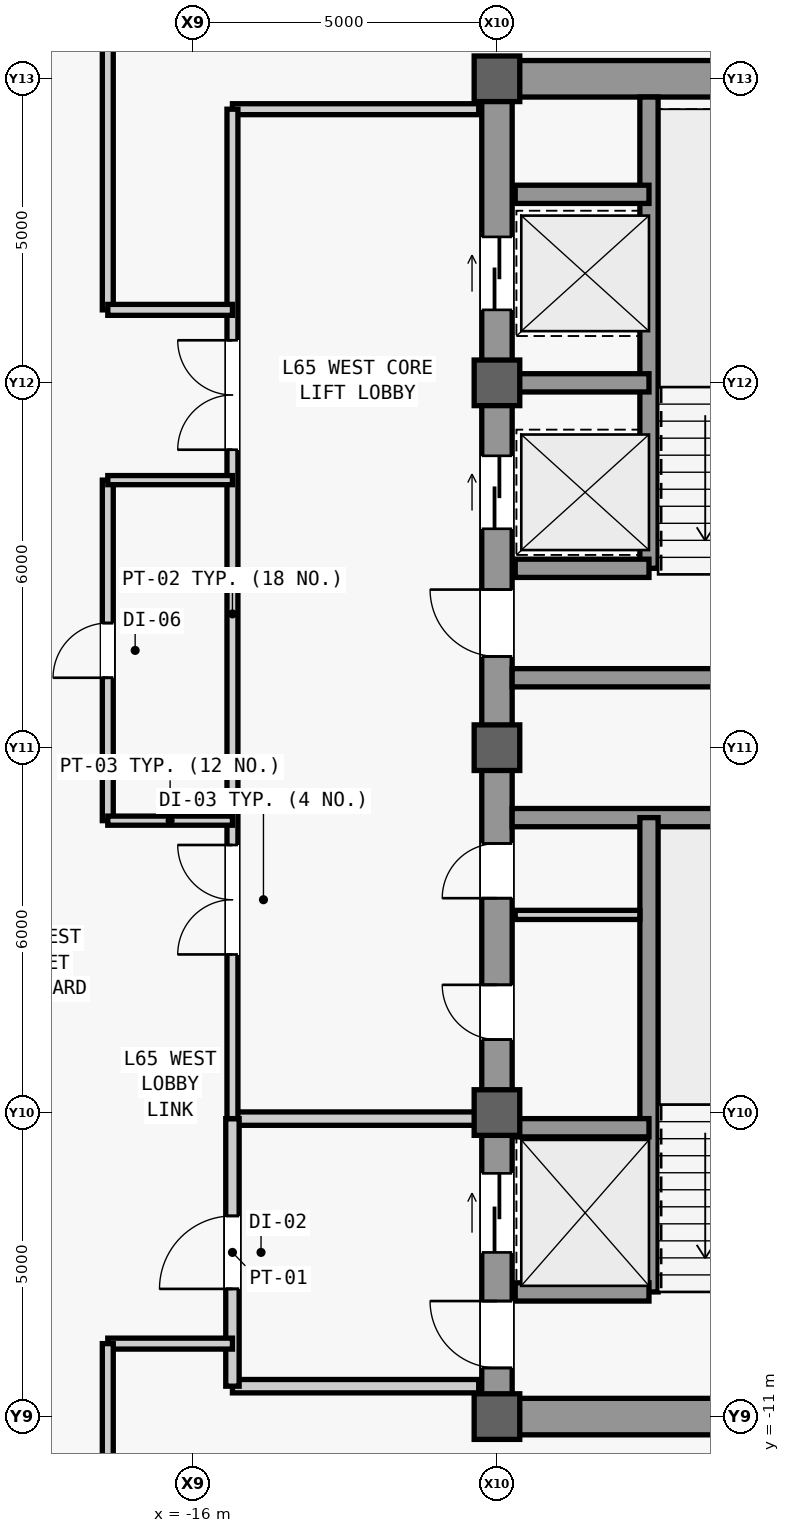
"""IFC4 building model, lengths in metres.
Left out: names, types, materials, properties, quantities, classifications, styles, units other than length and angle.
Written with IfcOpenShell. Run it as: python <this file> out.ifc"""

import sys

from ifc_helpers import new_model, si_unit, direction, frame, frame_2d, origin, origin_2d, place, context, subcontext, project, spatial, rectangle, extrude, source, transform, mapped, element, fill, save


model = new_model("IFC4")
c1 = context("Model", 3, precision=1e-05, world=origin(), true_north=direction((0.0, 1.0)))
c2 = subcontext(c1, "Body", "Model", "MODEL_VIEW")
j1 = project(units=[si_unit("LENGTHUNIT", "METRE"), si_unit("PLANEANGLEUNIT", "RADIAN")], contexts=[c1])
p1 = place(None, origin())
s1 = spatial("IfcSite", under=j1, at=p1, CompositionType="ELEMENT")
p2 = place(p1, origin())
s2 = spatial("IfcBuilding", under=s1, at=p2, CompositionType="ELEMENT")
p3 = place(p2, frame((0.0, 0.0, 277.5)))
s3 = spatial("IfcBuildingStorey", under=s2, at=p3, CompositionType="ELEMENT", Elevation=277.5)
m1 = source(origin(), c2, "Body", "SweptSolid", [
    extrude(rectangle(XDim=22.0, YDim=0.5, at=frame_2d((11.0, 0.0))), origin(), (0.0, 0.0, 1.0), 3.78),
])
p4 = place(p3, frame((-11.0, -11.0, 0.0), z_axis=(0.0, 0.0, 1.0), x_axis=(0.0, 1.0, 0.0)))
e1 = element("IfcWall", 1, at=p4, inside=s3, PredefinedType="SHEAR", context=c2, shape_type="MappedRepresentation", body=[
    mapped(m1, transform((0.0, 0.0, 0.0), scale=1.0)),
])
m2 = source(origin(), c2, "Body", "SweptSolid", [
    extrude(rectangle(XDim=1.1, YDim=2.2, at=frame_2d((0.55, 1.1))), frame((0.0, 0.26, 0.0), z_axis=(0.0, -1.0, 0.0), x_axis=(1.0, 0.0, 0.0)), (0.0, 0.0, 1.0), 0.52),
])
p5 = place(p4, frame((0.8, 0.0, 0.0)))
e2 = element("IfcOpeningElement", 2, at=p5, cuts=e1, PredefinedType="OPENING", context=c2, shape_type="MappedRepresentation", body=[
    mapped(m2, transform((0.0, 0.0, 0.0), scale=1.0)),
])
p6 = place(p4, frame((12.5, 0.0, 0.0)))
e3 = element("IfcOpeningElement", 3, at=p6, cuts=e1, PredefinedType="OPENING", context=c2, shape_type="MappedRepresentation", body=[
    mapped(m2, transform((0.0, 0.0, 0.0), scale=1.0)),
])
m3 = source(origin(), c2, "Body", "SweptSolid", [
    extrude(rectangle(XDim=0.9, YDim=2.15, at=frame_2d((0.45, 1.075))), frame((0.0, 0.26, 0.0), z_axis=(0.0, -1.0, 0.0), x_axis=(1.0, 0.0, 0.0)), (0.0, 0.0, 1.0), 0.52),
])
p7 = place(p4, frame((6.2, 0.0, 0.0)))
e4 = element("IfcOpeningElement", 4, at=p7, cuts=e1, PredefinedType="OPENING", context=c2, shape_type="MappedRepresentation", body=[
    mapped(m3, transform((0.0, 0.0, 0.0), scale=1.0)),
])
p8 = place(p4, frame((8.525, 0.0, 0.0)))
e5 = element("IfcOpeningElement", 5, at=p8, cuts=e1, PredefinedType="OPENING", context=c2, shape_type="MappedRepresentation", body=[
    mapped(m3, transform((0.0, 0.0, 0.0), scale=1.0)),
])
m4 = source(origin(), c2, "Body", "SweptSolid", [
    extrude(rectangle(XDim=1.2, YDim=2.3, at=frame_2d((0.6, 1.15))), frame((0.0, 0.26, 0.0), z_axis=(0.0, -1.0, 0.0), x_axis=(1.0, 0.0, 0.0)), (0.0, 0.0, 1.0), 0.52),
])
p9 = place(p4, frame((14.6, 0.0, 0.0)))
e6 = element("IfcOpeningElement", 6, at=p9, cuts=e1, PredefinedType="OPENING", context=c2, shape_type="MappedRepresentation", body=[
    mapped(m4, transform((0.0, 0.0, 0.0), scale=1.0)),
])
p10 = place(p4, frame((18.2, 0.0, 0.0)))
e7 = element("IfcOpeningElement", 7, at=p10, cuts=e1, PredefinedType="OPENING", context=c2, shape_type="MappedRepresentation", body=[
    mapped(m4, transform((0.0, 0.0, 0.0), scale=1.0)),
])
m5 = source(origin(), c2, "Body", "SweptSolid", [
    extrude(rectangle(XDim=1.3, YDim=2.3, at=frame_2d((0.65, 1.15))), frame((0.0, 0.26, 0.0), z_axis=(0.0, -1.0, 0.0), x_axis=(1.0, 0.0, 0.0)), (0.0, 0.0, 1.0), 0.52),
])
p11 = place(p4, frame((2.7, 0.0, 0.0)))
e8 = element("IfcOpeningElement", 8, at=p11, cuts=e1, PredefinedType="OPENING", context=c2, shape_type="MappedRepresentation", body=[
    mapped(m5, transform((0.0, 0.0, 0.0), scale=1.0)),
])
m6 = source(origin(), c2, "Body", "SweptSolid", [
    extrude(rectangle(XDim=5.9, YDim=0.6, at=frame_2d((2.95, 0.0))), origin(), (0.0, 0.0, 1.0), 3.78),
])
for number, where, z_axis, x_axis in (
    (9, (-10.75, -11.0, 0.0), (0.0, 0.0, 1.0), (1.0, 0.0, 0.0)),
    (10, (-10.75, 11.0, 0.0), (0.0, 0.0, 1.0), (1.0, 0.0, 0.0)),
):
    element("IfcWall", number, at=place(p3, frame(where, z_axis=z_axis, x_axis=x_axis)), inside=s3, PredefinedType="SHEAR", context=c2, shape_type="MappedRepresentation", body=[
        mapped(m6, transform((0.0, 0.0, 0.0), scale=1.0)),
    ])
m7 = source(origin(), c2, "Body", "SweptSolid", [
    extrude(rectangle(XDim=5.65, YDim=0.3, at=frame_2d((2.825, 0.0))), origin(), (0.0, 0.0, 1.0), 3.78),
])
for number, where, z_axis, x_axis in (
    (11, (-10.75, -1.15, 0.0), (0.0, 0.0, 1.0), (1.0, 0.0, 0.0)),
    (12, (-10.75, 1.15, 0.0), (0.0, 0.0, 1.0), (1.0, 0.0, 0.0)),
):
    element("IfcWall", number, at=place(p3, frame(where, z_axis=z_axis, x_axis=x_axis)), inside=s3, PredefinedType="SHEAR", context=c2, shape_type="MappedRepresentation", body=[
        mapped(m7, transform((0.0, 0.0, 0.0), scale=1.0)),
    ])
m8 = source(origin(), c2, "Body", "SweptSolid", [
    extrude(rectangle(XDim=0.75, YDim=0.75, at=origin_2d()), origin(), (0.0, 0.0, 1.0), 4.0),
])
for number, where, z_axis, x_axis in (
    (13, (-11.0, -11.0, 0.0), (0.0, 0.0, 1.0), (1.0, 0.0, 0.0)),
    (14, (-11.0, -6.0, 0.0), (0.0, 0.0, 1.0), (1.0, 0.0, 0.0)),
    (15, (-11.0, 0.0, 0.0), (0.0, 0.0, 1.0), (1.0, 0.0, 0.0)),
    (16, (-11.0, 6.0, 0.0), (0.0, 0.0, 1.0), (1.0, 0.0, 0.0)),
    (17, (-11.0, 11.0, 0.0), (0.0, 0.0, 1.0), (1.0, 0.0, 0.0)),
):
    element("IfcColumn", number, at=place(p3, frame(where, z_axis=z_axis, x_axis=x_axis)), inside=s3, PredefinedType="COLUMN", context=c2, shape_type="MappedRepresentation", body=[
        mapped(m8, transform((0.0, 0.0, 0.0), scale=1.0)),
    ])
m9 = source(origin(), c2, "Body", "SweptSolid", [
    extrude(rectangle(XDim=7.8, YDim=0.3, at=frame_2d((3.9, 0.0))), origin(), (0.0, 0.0, 1.0), 3.78),
])
p12 = place(p3, frame((-8.5, -8.95, 0.0), z_axis=(0.0, 0.0, 1.0), x_axis=(0.0, 1.0, 0.0)))
e18 = element("IfcWall", 18, at=p12, inside=s3, PredefinedType="SHEAR", context=c2, shape_type="MappedRepresentation", body=[
    mapped(m9, transform((0.0, 0.0, 0.0), scale=1.0)),
])
m10 = source(origin(), c2, "Body", "SweptSolid", [
    extrude(rectangle(XDim=2.2, YDim=0.3, at=frame_2d((1.1, 0.0))), origin(), (0.0, 0.0, 1.0), 3.78),
])
for number, where, z_axis, x_axis in (
    (19, (-10.7, -8.95, 0.0), (0.0, 0.0, 1.0), (1.0, 0.0, 0.0)),
    (20, (-10.7, -6.25, 0.0), (0.0, 0.0, 1.0), (1.0, 0.0, 0.0)),
):
    element("IfcWall", number, at=place(p3, frame(where, z_axis=z_axis, x_axis=x_axis)), inside=s3, PredefinedType="SHEAR", context=c2, shape_type="MappedRepresentation", body=[
        mapped(m10, transform((0.0, 0.0, 0.0), scale=1.0)),
    ])
m11 = source(origin(), c2, "Body", "SweptSolid", [
    extrude(rectangle(XDim=7.75, YDim=0.3, at=frame_2d((3.875, 0.0))), origin(), (0.0, 0.0, 1.0), 3.78),
])
p13 = place(p3, frame((-8.5, 2.95, 0.0), z_axis=(0.0, 0.0, 1.0), x_axis=(0.0, 1.0, 0.0)))
e21 = element("IfcWall", 21, at=p13, inside=s3, PredefinedType="SHEAR", context=c2, shape_type="MappedRepresentation", body=[
    mapped(m11, transform((0.0, 0.0, 0.0), scale=1.0)),
])
for number, where, z_axis, x_axis in (
    (22, (-10.7, 2.95, 0.0), (0.0, 0.0, 1.0), (1.0, 0.0, 0.0)),
    (23, (-10.7, 6.0, 0.0), (0.0, 0.0, 1.0), (1.0, 0.0, 0.0)),
    (24, (-10.7, 9.1, 0.0), (0.0, 0.0, 1.0), (1.0, 0.0, 0.0)),
):
    element("IfcWall", number, at=place(p3, frame(where, z_axis=z_axis, x_axis=x_axis)), inside=s3, PredefinedType="SHEAR", context=c2, shape_type="MappedRepresentation", body=[
        mapped(m10, transform((0.0, 0.0, 0.0), scale=1.0)),
    ])
m12 = source(origin(), c2, "Body", "SweptSolid", [
    extrude(rectangle(XDim=2.05, YDim=0.15, at=frame_2d((1.025, 0.0))), origin(), (0.0, 0.0, 1.0), 3.78),
])
p14 = place(p3, frame((-10.7, -2.75, 0.0), z_axis=(0.0, 0.0, 1.0), x_axis=(1.0, 0.0, 0.0)))
e25 = element("IfcWall", 25, at=p14, inside=s3, PredefinedType="PARTITIONING", context=c2, shape_type="MappedRepresentation", body=[
    mapped(m12, transform((0.0, 0.0, 0.0), scale=1.0)),
])
m13 = source(origin(), c2, "Body", "SweptSolid", [
    extrude(rectangle(XDim=4.05, YDim=0.22, at=frame_2d((2.025, 0.0))), origin(), (0.0, 0.0, 1.0), 3.78),
])
p15 = place(p3, frame((-15.35, -10.5, 0.0), z_axis=(0.0, 0.0, 1.0), x_axis=(1.0, 0.0, 0.0)))
e26 = element("IfcWall", 26, at=p15, inside=s3, PredefinedType="PARTITIONING", context=c2, shape_type="MappedRepresentation", body=[
    mapped(m13, transform((0.0, 0.0, 0.0), scale=1.0)),
])
m14 = source(origin(), c2, "Body", "SweptSolid", [
    extrude(rectangle(XDim=4.05, YDim=0.22, at=frame_2d((2.025, 0.0))), origin(), (0.0, 0.0, 1.0), 3.085),
])
p16 = place(p3, frame((-15.35, -6.1, 0.0), z_axis=(0.0, 0.0, 1.0), x_axis=(1.0, 0.0, 0.0)))
e27 = element("IfcWall", 27, at=p16, inside=s3, PredefinedType="PARTITIONING", context=c2, shape_type="MappedRepresentation", body=[
    mapped(m14, transform((0.0, 0.0, 0.0), scale=1.0)),
])
m15 = source(origin(), c2, "Body", "SweptSolid", [
    extrude(rectangle(XDim=4.4, YDim=0.22, at=frame_2d((2.2, 0.0))), origin(), (0.0, 0.0, 1.0), 3.78),
])
p17 = place(p3, frame((-15.35, -10.5, 0.0), z_axis=(0.0, 0.0, 1.0), x_axis=(0.0, 1.0, 0.0)))
e28 = element("IfcWall", 28, at=p17, inside=s3, PredefinedType="PARTITIONING", context=c2, shape_type="MappedRepresentation", body=[
    mapped(m15, transform((0.0, 0.0, 0.0), scale=1.0)),
])
m16 = source(origin(), c2, "Body", "SweptSolid", [
    extrude(rectangle(XDim=1.2, YDim=2.2, at=frame_2d((0.6, 1.1))), frame((0.0, 0.12, 0.0), z_axis=(0.0, -1.0, 0.0), x_axis=(1.0, 0.0, 0.0)), (0.0, 0.0, 1.0), 0.24),
])
p18 = place(p17, frame((1.6, 0.0, 0.0)))
e29 = element("IfcOpeningElement", 29, at=p18, cuts=e28, PredefinedType="OPENING", context=c2, shape_type="MappedRepresentation", body=[
    mapped(m16, transform((0.0, 0.0, 0.0), scale=1.0)),
])
m17 = source(origin(), c2, "Body", "SweptSolid", [
    extrude(rectangle(XDim=4.05, YDim=0.18, at=frame_2d((2.025, 0.0))), origin(), (0.0, 0.0, 1.0), 3.78),
])
p19 = place(p3, frame((-15.35, 10.5, 0.0), z_axis=(0.0, 0.0, 1.0), x_axis=(1.0, 0.0, 0.0)))
e30 = element("IfcWall", 30, at=p19, inside=s3, PredefinedType="PARTITIONING", context=c2, shape_type="MappedRepresentation", body=[
    mapped(m17, transform((0.0, 0.0, 0.0), scale=1.0)),
])
m18 = source(origin(), c2, "Body", "SweptSolid", [
    extrude(rectangle(XDim=16.6, YDim=0.18, at=frame_2d((8.3, 0.0))), origin(), (0.0, 0.0, 1.0), 3.78),
])
p20 = place(p3, frame((-15.35, -6.1, 0.0), z_axis=(0.0, 0.0, 1.0), x_axis=(0.0, 1.0, 0.0)))
e31 = element("IfcWall", 31, at=p20, inside=s3, PredefinedType="PARTITIONING", context=c2, shape_type="MappedRepresentation", body=[
    mapped(m18, transform((0.0, 0.0, 0.0), scale=1.0)),
])
m19 = source(origin(), c2, "Body", "SweptSolid", [
    extrude(rectangle(XDim=1.8, YDim=2.25, at=frame_2d((0.9, 1.125))), frame((0.0, 0.1, 0.0), z_axis=(0.0, -1.0, 0.0), x_axis=(1.0, 0.0, 0.0)), (0.0, 0.0, 1.0), 0.2),
])
p21 = place(p20, frame((2.7, 0.0, 0.0)))
e32 = element("IfcOpeningElement", 32, at=p21, cuts=e31, PredefinedType="OPENING", context=c2, shape_type="MappedRepresentation", body=[
    mapped(m19, transform((0.0, 0.0, 0.0), scale=1.0)),
])
p22 = place(p20, frame((11.0, 0.0, 0.0)))
e33 = element("IfcOpeningElement", 33, at=p22, cuts=e31, PredefinedType="OPENING", context=c2, shape_type="MappedRepresentation", body=[
    mapped(m19, transform((0.0, 0.0, 0.0), scale=1.0)),
])
m20 = source(origin(), c2, "Body", "SweptSolid", [
    extrude(rectangle(XDim=5.6, YDim=0.18, at=frame_2d((2.8, 0.0))), origin(), (0.0, 0.0, 1.0), 3.78),
])
p23 = place(p3, frame((-17.4, -1.2, 0.0), z_axis=(0.0, 0.0, 1.0), x_axis=(0.0, 1.0, 0.0)))
e34 = element("IfcWall", 34, at=p23, inside=s3, PredefinedType="PARTITIONING", context=c2, shape_type="MappedRepresentation", body=[
    mapped(m20, transform((0.0, 0.0, 0.0), scale=1.0)),
])
m21 = source(origin(), c2, "Body", "SweptSolid", [
    extrude(rectangle(XDim=0.9, YDim=2.15, at=frame_2d((0.45, 1.075))), frame((0.0, 0.1, 0.0), z_axis=(0.0, -1.0, 0.0), x_axis=(1.0, 0.0, 0.0)), (0.0, 0.0, 1.0), 0.2),
])
p24 = place(p23, frame((2.35, 0.0, 0.0)))
e35 = element("IfcOpeningElement", 35, at=p24, cuts=e34, PredefinedType="OPENING", context=c2, shape_type="MappedRepresentation", body=[
    mapped(m21, transform((0.0, 0.0, 0.0), scale=1.0)),
])
m22 = source(origin(), c2, "Body", "SweptSolid", [
    extrude(rectangle(XDim=2.05, YDim=0.15, at=frame_2d((1.025, 0.0))), origin(), (0.0, 0.0, 1.0), 3.78),
])
for number, where, z_axis, x_axis in (
    (36, (-17.4, -1.2, 0.0), (0.0, 0.0, 1.0), (1.0, 0.0, 0.0)),
    (37, (-17.4, 4.4, 0.0), (0.0, 0.0, 1.0), (1.0, 0.0, 0.0)),
):
    element("IfcWall", number, at=place(p3, frame(where, z_axis=z_axis, x_axis=x_axis)), inside=s3, PredefinedType="PARTITIONING", context=c2, shape_type="MappedRepresentation", body=[
        mapped(m22, transform((0.0, 0.0, 0.0), scale=1.0)),
    ])
m23 = source(origin(), c2, "Body", "SweptSolid", [
    extrude(rectangle(XDim=2.05, YDim=0.18, at=frame_2d((1.025, 0.0))), origin(), (0.0, 0.0, 1.0), 3.78),
])
p25 = place(p3, frame((-17.4, -9.8, 0.0), z_axis=(0.0, 0.0, 1.0), x_axis=(1.0, 0.0, 0.0)))
e38 = element("IfcWall", 38, at=p25, inside=s3, PredefinedType="PARTITIONING", context=c2, shape_type="MappedRepresentation", body=[
    mapped(m23, transform((0.0, 0.0, 0.0), scale=1.0)),
])
m24 = source(origin(), c2, "Body", "SweptSolid", [
    extrude(rectangle(XDim=8.4, YDim=0.18, at=frame_2d((4.2, 0.0))), origin(), (0.0, 0.0, 1.0), 3.78),
])
p26 = place(p3, frame((-17.4, 7.2, 0.0), z_axis=(0.0, 0.0, 1.0), x_axis=(0.0, 1.0, 0.0)))
e39 = element("IfcWall", 39, at=p26, inside=s3, PredefinedType="PARTITIONING", context=c2, shape_type="MappedRepresentation", body=[
    mapped(m24, transform((0.0, 0.0, 0.0), scale=1.0)),
])
p27 = place(p3, frame((-17.4, 7.2, 0.0), z_axis=(0.0, 0.0, 1.0), x_axis=(1.0, 0.0, 0.0)))
e40 = element("IfcWall", 40, at=p27, inside=s3, PredefinedType="PARTITIONING", context=c2, shape_type="MappedRepresentation", body=[
    mapped(m23, transform((0.0, 0.0, 0.0), scale=1.0)),
])
m25 = source(origin(), c2, "Body", "SweptSolid", [
    extrude(rectangle(XDim=7.2, YDim=0.18, at=frame_2d((3.6, 0.0))), origin(), (0.0, 0.0, 1.0), 3.78),
])
p28 = place(p3, frame((-17.4, -17.0, 0.0), z_axis=(0.0, 0.0, 1.0), x_axis=(0.0, 1.0, 0.0)))
e41 = element("IfcWall", 41, at=p28, inside=s3, PredefinedType="PARTITIONING", context=c2, shape_type="MappedRepresentation", body=[
    mapped(m25, transform((0.0, 0.0, 0.0), scale=1.0)),
])
m26 = source(origin(), c2, "Body", "SweptSolid", [
    extrude(rectangle(XDim=1.1, YDim=2.2, at=frame_2d((0.55, 1.1))), frame((0.0, 0.025, 0.0), z_axis=(0.0, -1.0, 0.0), x_axis=(1.0, 0.0, 0.0)), (0.0, 0.0, 1.0), 0.05),
])
p29 = place(p5, origin())
e42 = element("IfcDoor", 42, at=p29, inside=s3, OperationType="SINGLE_SWING_RIGHT", PredefinedType="DOOR", context=c2, shape_type="MappedRepresentation", body=[
    mapped(m26, transform((0.0, 0.0, 0.0), scale=1.0)),
])
fill(e2, e42)
p30 = place(p6, origin())
e43 = element("IfcDoor", 43, at=p30, inside=s3, OperationType="SINGLE_SWING_RIGHT", PredefinedType="DOOR", context=c2, shape_type="MappedRepresentation", body=[
    mapped(m26, transform((0.0, 0.0, 0.0), scale=1.0)),
])
fill(e3, e43)
m27 = source(origin(), c2, "Body", "SweptSolid", [
    extrude(rectangle(XDim=0.9, YDim=2.15, at=frame_2d((0.45, 1.075))), frame((0.0, 0.025, 0.0), z_axis=(0.0, -1.0, 0.0), x_axis=(1.0, 0.0, 0.0)), (0.0, 0.0, 1.0), 0.05),
])
p31 = place(p7, origin())
e44 = element("IfcDoor", 44, at=p31, inside=s3, OperationType="SINGLE_SWING_RIGHT", PredefinedType="DOOR", context=c2, shape_type="MappedRepresentation", body=[
    mapped(m27, transform((0.0, 0.0, 0.0), scale=1.0)),
])
fill(e4, e44)
p32 = place(p8, origin())
e45 = element("IfcDoor", 45, at=p32, inside=s3, OperationType="SINGLE_SWING_LEFT", PredefinedType="DOOR", context=c2, shape_type="MappedRepresentation", body=[
    mapped(m27, transform((0.0, 0.0, 0.0), scale=1.0)),
])
fill(e5, e45)
m28 = source(origin(), c2, "Body", "SweptSolid", [
    extrude(rectangle(XDim=1.2, YDim=2.2, at=frame_2d((0.6, 1.1))), frame((0.0, 0.025, 0.0), z_axis=(0.0, -1.0, 0.0), x_axis=(1.0, 0.0, 0.0)), (0.0, 0.0, 1.0), 0.05),
])
p33 = place(p18, origin())
e46 = element("IfcDoor", 46, at=p33, inside=s3, OperationType="SINGLE_SWING_LEFT", PredefinedType="DOOR", context=c2, shape_type="MappedRepresentation", body=[
    mapped(m28, transform((0.0, 0.0, 0.0), scale=1.0)),
])
fill(e29, e46)
m29 = source(origin(), c2, "Body", "SweptSolid", [
    extrude(rectangle(XDim=1.8, YDim=2.25, at=frame_2d((0.9, 1.125))), frame((0.0, 0.025, 0.0), z_axis=(0.0, -1.0, 0.0), x_axis=(1.0, 0.0, 0.0)), (0.0, 0.0, 1.0), 0.05),
])
p34 = place(p21, origin())
e47 = element("IfcDoor", 47, at=p34, inside=s3, OperationType="SINGLE_SWING_LEFT", PredefinedType="DOOR", context=c2, shape_type="MappedRepresentation", body=[
    mapped(m29, transform((0.0, 0.0, 0.0), scale=1.0)),
])
fill(e32, e47)
p35 = place(p22, origin())
e48 = element("IfcDoor", 48, at=p35, inside=s3, OperationType="SINGLE_SWING_RIGHT", PredefinedType="DOOR", context=c2, shape_type="MappedRepresentation", body=[
    mapped(m29, transform((0.0, 0.0, 0.0), scale=1.0)),
])
fill(e33, e48)
p36 = place(p24, origin())
e49 = element("IfcDoor", 49, at=p36, inside=s3, OperationType="SINGLE_SWING_LEFT", PredefinedType="DOOR", context=c2, shape_type="MappedRepresentation", body=[
    mapped(m27, transform((0.0, 0.0, 0.0), scale=1.0)),
])
fill(e35, e49)
m30 = source(origin(), c2, "Body", "SweptSolid", [
    extrude(rectangle(XDim=1.2, YDim=2.3, at=frame_2d((0.6, 1.15))), frame((0.0, 0.025, 0.0), z_axis=(0.0, -1.0, 0.0), x_axis=(1.0, 0.0, 0.0)), (0.0, 0.0, 1.0), 0.05),
])
p37 = place(p9, origin())
e50 = element("IfcDoor", 50, at=p37, inside=s3, OperationType="SLIDING_TO_LEFT", PredefinedType="DOOR", context=c2, shape_type="MappedRepresentation", body=[
    mapped(m30, transform((0.0, 0.0, 0.0), scale=1.0)),
])
fill(e6, e50)
p38 = place(p10, origin())
e51 = element("IfcDoor", 51, at=p38, inside=s3, OperationType="SLIDING_TO_LEFT", PredefinedType="DOOR", context=c2, shape_type="MappedRepresentation", body=[
    mapped(m30, transform((0.0, 0.0, 0.0), scale=1.0)),
])
fill(e7, e51)
m31 = source(origin(), c2, "Body", "SweptSolid", [
    extrude(rectangle(XDim=1.3, YDim=2.3, at=frame_2d((0.65, 1.15))), frame((0.0, 0.025, 0.0), z_axis=(0.0, -1.0, 0.0), x_axis=(1.0, 0.0, 0.0)), (0.0, 0.0, 1.0), 0.05),
])
p39 = place(p11, origin())
e52 = element("IfcDoor", 52, at=p39, inside=s3, OperationType="SLIDING_TO_LEFT", PredefinedType="DOOR", context=c2, shape_type="MappedRepresentation", body=[
    mapped(m31, transform((0.0, 0.0, 0.0), scale=1.0)),
])
fill(e8, e52)
save(model, sys.argv[1])
